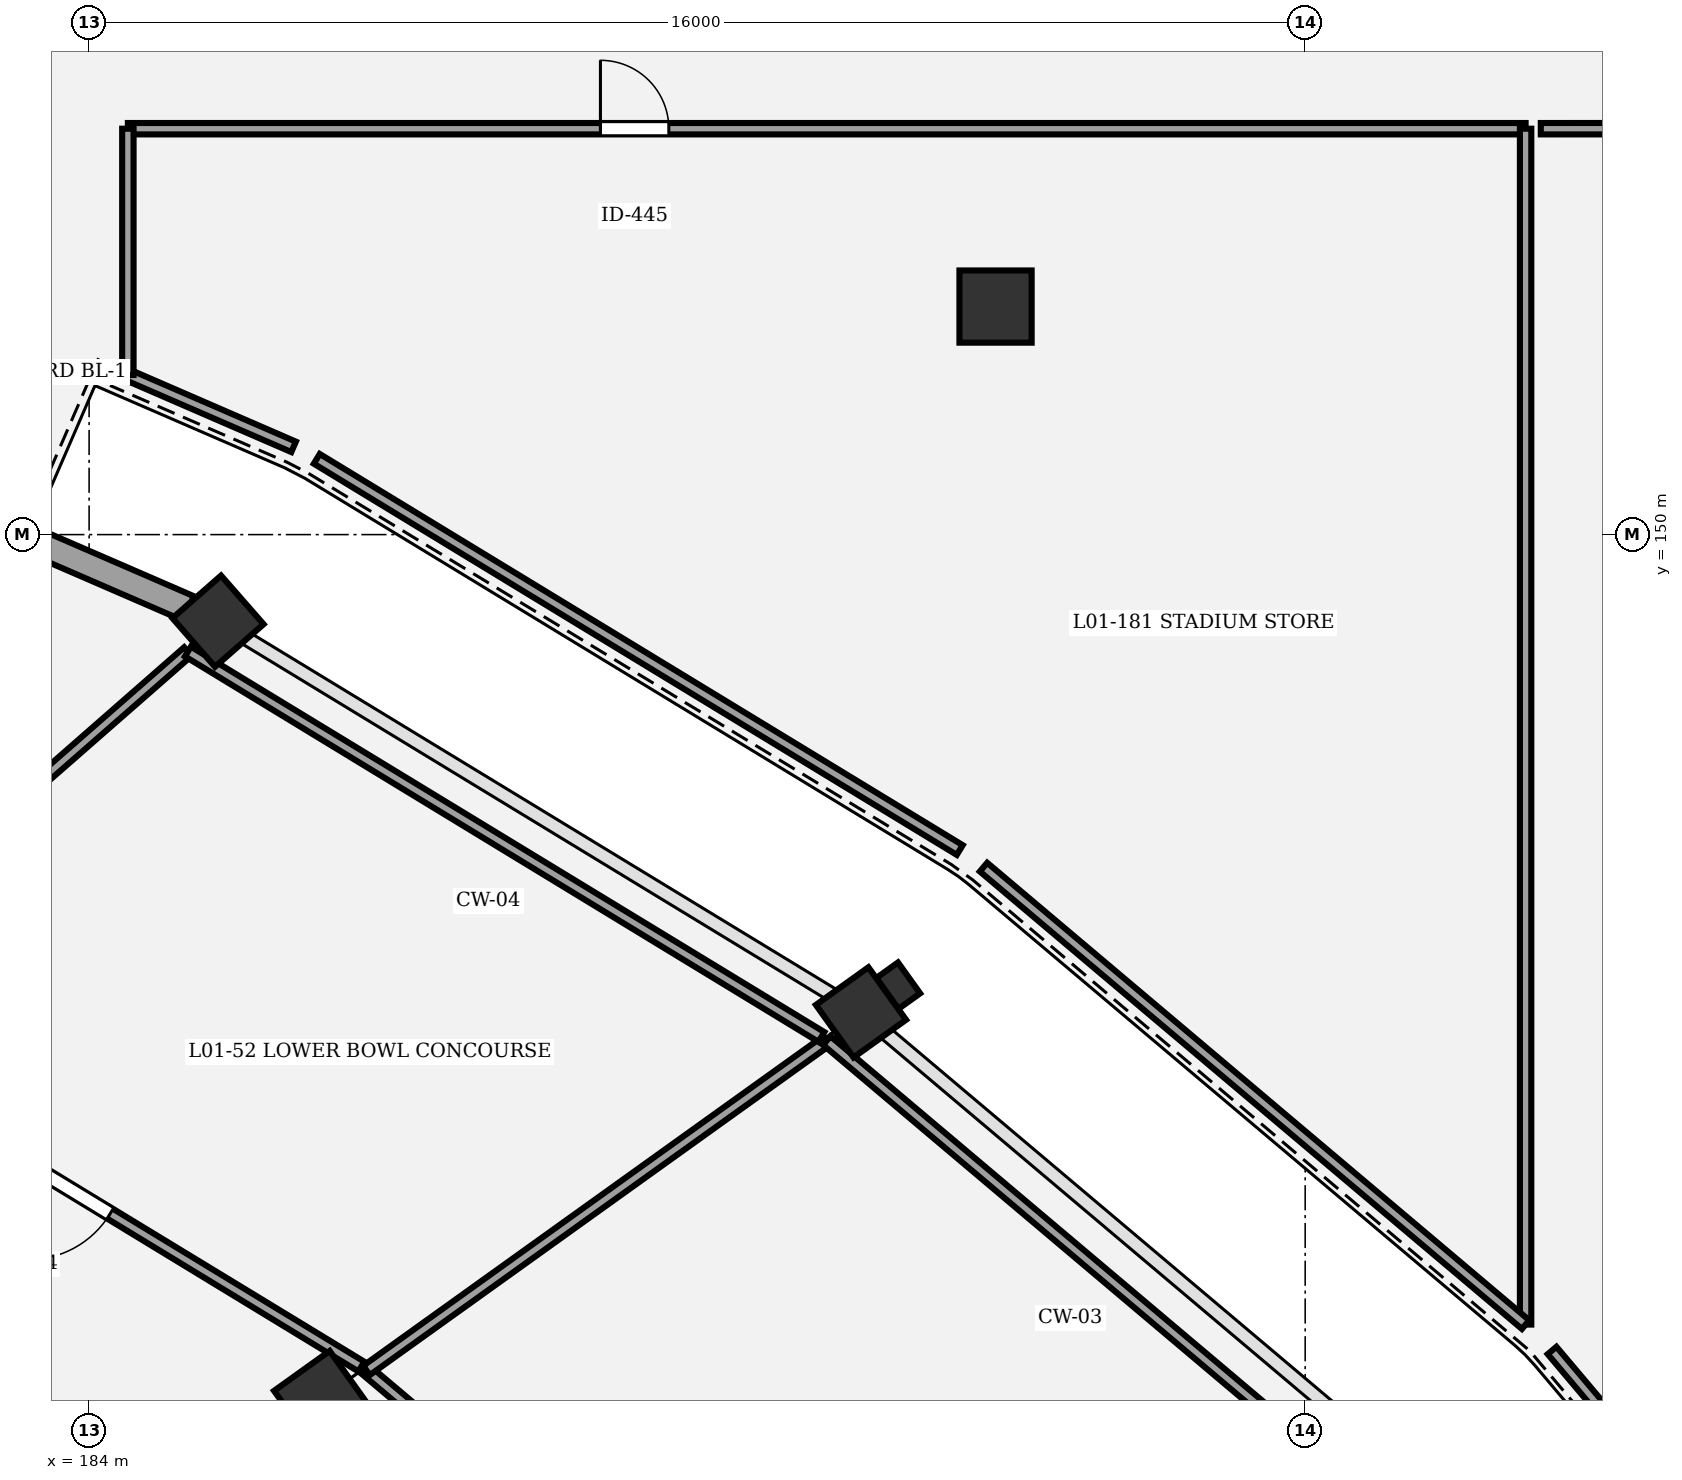
"""IFC4 building model, lengths in metres.
Left out: names, types, materials, properties, quantities, classifications, styles, units other than length and angle.
Written with IfcOpenShell. Run it as: python <this file> out.ifc"""

import sys

from ifc_helpers import new_model, si_unit, direction, frame, frame_2d, origin, origin_2d, place, context, subcontext, project, spatial, rectangle, circle, extrude, element, fill, save


model = new_model("IFC4")
c1 = context("Model", 3, precision=1e-05, world=origin(), true_north=direction((0.0, 1.0)))
c2 = subcontext(c1, "Body", "Model", "MODEL_VIEW")
j1 = project(units=[si_unit("LENGTHUNIT", "METRE"), si_unit("PLANEANGLEUNIT", "RADIAN")], contexts=[c1])
p1 = place(None, origin())
s1 = spatial("IfcSite", under=j1, at=p1, CompositionType="ELEMENT")
p2 = place(p1, origin())
s2 = spatial("IfcBuilding", under=s1, at=p2, CompositionType="ELEMENT")
p3 = place(p2, frame((0.0, 0.0, 5.4)))
s3 = spatial("IfcBuildingStorey", under=s2, at=p3, CompositionType="ELEMENT", Elevation=5.4)
p4 = place(p3, frame((187.061, 138.632, 0.0), z_axis=(0.0, 0.0, 1.0), x_axis=(0.812897512265, 0.582406760395, 0.0)))
e1 = element("IfcColumn", 1, at=p4, inside=s3, PredefinedType="COLUMN", context=c2, shape_type="SweptSolid", body=[
    extrude(rectangle(XDim=0.9, YDim=0.9, at=origin_2d()), origin(), (0.0, 0.0, 1.0), 4.8),
])
p5 = place(p3, frame((194.156, 143.715, 0.0), z_axis=(0.0, 0.0, 1.0), x_axis=(0.812897512265, 0.582406760395, 0.0)))
e2 = element("IfcColumn", 2, at=p5, inside=s3, PredefinedType="COLUMN", context=c2, shape_type="SweptSolid", body=[
    extrude(rectangle(XDim=0.85, YDim=0.85, at=origin_2d()), origin(), (0.0, 0.0, 1.0), 4.8),
])
p6 = place(p3, frame((194.646, 144.066, 0.0), z_axis=(0.0, 0.0, 1.0), x_axis=(-0.582406760395, 0.812897512265, 0.0)))
e3 = element("IfcColumn", 3, at=p6, inside=s3, PredefinedType="PILASTER", context=c2, shape_type="SweptSolid", body=[
    extrude(rectangle(XDim=0.5, YDim=0.35, at=origin_2d()), origin(), (0.0, 0.0, 1.0), 4.8),
])
p7 = place(p3, frame((185.696, 148.861, 0.0), z_axis=(0.0, 0.0, 1.0), x_axis=(0.752529860433, 0.658558128912, 0.0)))
e4 = element("IfcColumn", 4, at=p7, inside=s3, PredefinedType="COLUMN", context=c2, shape_type="SweptSolid", body=[
    extrude(rectangle(XDim=0.85, YDim=0.85, at=origin_2d()), origin(), (0.0, 0.0, 1.0), 4.8),
])
p8 = place(p3, frame((195.926, 153.0, 0.0), z_axis=(0.0, 0.0, 1.0), x_axis=(1.0, 0.0, 0.0)))
e5 = element("IfcColumn", 5, at=p8, inside=s3, PredefinedType="COLUMN", context=c2, shape_type="SweptSolid", body=[
    extrude(circle(Radius=0.475, at=origin_2d()), origin(), (0.0, 0.0, 1.0), 4.8),
])
p9 = place(p3, frame((176.326, 152.923, 0.0), z_axis=(0.0, 0.0, 1.0), x_axis=(0.91749374913, -0.397750198375, 0.0)))
e6 = element("IfcWall", 6, at=p9, inside=s3, PredefinedType="STANDARD", context=c2, shape_type="SweptSolid", body=[
    extrude(rectangle(XDim=9.79, YDim=0.35, at=frame_2d((4.895, 0.0))), origin(), (0.0, 0.0, 1.0), 3.57),
])
p10 = place(p9, frame((3.995, 0.0, 0.0)))
e7 = element("IfcOpeningElement", 7, at=p10, cuts=e6, PredefinedType="OPENING", context=c2, shape_type="SweptSolid", body=[
    extrude(rectangle(XDim=1.8, YDim=2.4, at=frame_2d((0.9, 1.2))), frame((0.0, 0.185, 0.0), z_axis=(0.0, -1.0, 0.0), x_axis=(1.0, 0.0, 0.0)), (0.0, 0.0, 1.0), 0.37),
])
p11 = place(p3, frame((194.175, 133.497, 0.0), z_axis=(0.0, 0.0, 1.0), x_axis=(-0.764257572309, 0.644911128117, 0.0)))
e8 = element("IfcWall", 8, at=p11, inside=s3, PredefinedType="PARTITIONING", context=c2, shape_type="SweptSolid", body=[
    extrude(rectangle(XDim=8.539, YDim=0.15, at=frame_2d((4.269, 0.0))), origin(), (0.0, 0.0, 1.0), 3.55),
])
p12 = place(p11, frame((3.679, 0.0, 0.0)))
e9 = element("IfcOpeningElement", 9, at=p12, cuts=e8, PredefinedType="OPENING", context=c2, shape_type="SweptSolid", body=[
    extrude(rectangle(XDim=1.18, YDim=2.2, at=frame_2d((0.59, 1.1))), frame((0.0, 0.085, 0.0), z_axis=(0.0, -1.0, 0.0), x_axis=(1.0, 0.0, 0.0)), (0.0, 0.0, 1.0), 0.17),
])
p13 = place(p3, frame((187.582, 139.054, 0.0), z_axis=(0.0, 0.0, 1.0), x_axis=(-0.854321649351, 0.519744667554, 0.0)))
e10 = element("IfcWall", 10, at=p13, inside=s3, PredefinedType="PARTITIONING", context=c2, shape_type="SweptSolid", body=[
    extrude(rectangle(XDim=8.999, YDim=0.15, at=frame_2d((4.499, 0.0))), origin(), (0.0, 0.0, 1.0), 3.55),
])
p14 = place(p13, frame((3.869, 0.0, 0.0)))
e11 = element("IfcOpeningElement", 11, at=p14, cuts=e10, PredefinedType="OPENING", context=c2, shape_type="SweptSolid", body=[
    extrude(rectangle(XDim=1.26, YDim=2.2, at=frame_2d((0.63, 1.1))), frame((0.0, 0.085, 0.0), z_axis=(0.0, -1.0, 0.0), x_axis=(1.0, 0.0, 0.0)), (0.0, 0.0, 1.0), 0.17),
])
p15 = place(p3, frame((184.51, 155.34, 0.0), z_axis=(0.0, 0.0, 1.0), x_axis=(1.0, 0.0, 0.0)))
e12 = element("IfcWall", 12, at=p15, inside=s3, PredefinedType="PARTITIONING", context=c2, shape_type="SweptSolid", body=[
    extrude(rectangle(XDim=18.39, YDim=0.15, at=frame_2d((9.195, 0.0))), origin(), (0.0, 0.0, 1.0), 3.55),
])
p16 = place(p15, frame((6.218, 0.0, 0.0)))
e13 = element("IfcOpeningElement", 13, at=p16, cuts=e12, PredefinedType="OPENING", context=c2, shape_type="SweptSolid", body=[
    extrude(rectangle(XDim=0.9, YDim=2.2, at=frame_2d((0.45, 1.1))), frame((0.0, 0.085, 0.0), z_axis=(0.0, -1.0, 0.0), x_axis=(1.0, 0.0, 0.0)), (0.0, 0.0, 1.0), 0.17),
])
p17 = place(p3, frame((187.649, 139.004, 0.0), z_axis=(0.0, 0.0, 1.0), x_axis=(0.812884613266, 0.582424763824, 0.0)))
e14 = element("IfcWall", 14, at=p17, inside=s3, PredefinedType="PARTITIONING", context=c2, shape_type="SweptSolid", body=[
    extrude(rectangle(XDim=7.45, YDim=0.15, at=frame_2d((3.725, 0.0))), origin(), (0.0, 0.0, 1.0), 3.55),
])
p18 = place(p3, frame((193.706, 143.343, 0.0), z_axis=(0.0, 0.0, 1.0), x_axis=(0.764252893528, -0.644916672706, 0.0)))
e15 = element("IfcWall", 15, at=p18, inside=s3, PredefinedType="PARTITIONING", context=c2, shape_type="SweptSolid", body=[
    extrude(rectangle(XDim=9.257, YDim=0.15, at=frame_2d((4.629, 0.0))), origin(), (0.0, 0.0, 1.0), 3.55),
])
p19 = place(p3, frame((179.895, 143.731, 0.0), z_axis=(0.0, 0.0, 1.0), x_axis=(0.752564061831, 0.658519045162, 0.0)))
e16 = element("IfcWall", 16, at=p19, inside=s3, PredefinedType="PARTITIONING", context=c2, shape_type="SweptSolid", body=[
    extrude(rectangle(XDim=7.183, YDim=0.15, at=frame_2d((3.592, 0.0))), origin(), (0.0, 0.0, 1.0), 3.55),
])
p20 = place(p3, frame((185.3, 148.461, 0.0), z_axis=(0.0, 0.0, 1.0), x_axis=(0.854323689683, -0.519741313777, 0.0)))
e17 = element("IfcWall", 17, at=p20, inside=s3, PredefinedType="PARTITIONING", context=c2, shape_type="SweptSolid", body=[
    extrude(rectangle(XDim=9.756, YDim=0.15, at=frame_2d((4.878, 0.0))), origin(), (0.0, 0.0, 1.0), 3.55),
])
p21 = place(p3, frame((195.455, 145.85, 0.0), z_axis=(0.0, 0.0, 1.0), x_axis=(-0.854333268174, 0.519725568826, 0.0)))
e18 = element("IfcWall", 18, at=p21, inside=s3, PredefinedType="PARTITIONING", context=c2, shape_type="SweptSolid", body=[
    extrude(rectangle(XDim=9.902, YDim=0.15, at=frame_2d((4.951, 0.0))), origin(), (0.0, 0.0, 1.0), 3.55),
])
p22 = place(p3, frame((186.69, 151.155, 0.0), z_axis=(0.0, 0.0, 1.0), x_axis=(-0.917484400903, 0.397771761314, 0.0)))
e19 = element("IfcWall", 19, at=p22, inside=s3, PredefinedType="PARTITIONING", context=c2, shape_type="SweptSolid", body=[
    extrude(rectangle(XDim=2.376, YDim=0.15, at=frame_2d((1.188, 0.0))), origin(), (0.0, 0.0, 1.0), 3.55),
])
p23 = place(p3, frame((184.51, 152.1, 0.0), z_axis=(0.0, 0.0, 1.0), x_axis=(0.0, 1.0, 0.0)))
e20 = element("IfcWall", 20, at=p23, inside=s3, PredefinedType="PARTITIONING", context=c2, shape_type="SweptSolid", body=[
    extrude(rectangle(XDim=3.24, YDim=0.15, at=frame_2d((1.62, 0.0))), origin(), (0.0, 0.0, 1.0), 3.55),
])
p24 = place(p3, frame((202.9, 155.34, 0.0), z_axis=(0.0, 0.0, 1.0), x_axis=(0.0, -1.0, 0.0)))
e21 = element("IfcWall", 21, at=p24, inside=s3, PredefinedType="PARTITIONING", context=c2, shape_type="SweptSolid", body=[
    extrude(rectangle(XDim=15.733, YDim=0.15, at=frame_2d((7.867, 0.0))), origin(), (0.0, 0.0, 1.0), 3.55),
])
p25 = place(p3, frame((202.9, 139.607, 0.0), z_axis=(0.0, 0.0, 1.0), x_axis=(-0.764245949545, 0.644924901523, 0.0)))
e22 = element("IfcWall", 22, at=p25, inside=s3, PredefinedType="PARTITIONING", context=c2, shape_type="SweptSolid", body=[
    extrude(rectangle(XDim=9.332, YDim=0.15, at=frame_2d((4.666, 0.0))), origin(), (0.0, 0.0, 1.0), 3.55),
])
p26 = place(p3, frame((209.153, 132.274, 0.0), z_axis=(0.0, 0.0, 1.0), x_axis=(-0.645180125691, 0.764030500316, 0.0)))
e23 = element("IfcWall", 23, at=p26, inside=s3, PredefinedType="PARTITIONING", context=c2, shape_type="SweptSolid", body=[
    extrude(rectangle(XDim=9.151, YDim=0.15, at=frame_2d((4.576, 0.0))), origin(), (0.0, 0.0, 1.0), 3.55),
])
p27 = place(p3, frame((203.1, 155.34, 0.0), z_axis=(0.0, 0.0, 1.0), x_axis=(0.99999997621, 0.00021812629, 0.0)))
e24 = element("IfcWall", 24, at=p27, inside=s3, PredefinedType="PARTITIONING", context=c2, shape_type="SweptSolid", body=[
    extrude(rectangle(XDim=13.431, YDim=0.15, at=frame_2d((6.716, 0.0))), origin(), (0.0, 0.0, 1.0), 3.55),
])
p28 = place(p14, origin())
e25 = element("IfcDoor", 25, at=p28, inside=s3, OperationType="SINGLE_SWING_RIGHT", PredefinedType="DOOR", context=c2, shape_type="SweptSolid", body=[
    extrude(rectangle(XDim=1.26, YDim=2.2, at=frame_2d((0.63, 1.1))), frame((0.0, 0.025, 0.0), z_axis=(0.0, -1.0, 0.0), x_axis=(1.0, 0.0, 0.0)), (0.0, 0.0, 1.0), 0.05),
])
fill(e11, e25)
p29 = place(p16, origin())
e26 = element("IfcDoor", 26, at=p29, inside=s3, OperationType="SINGLE_SWING_LEFT", PredefinedType="DOOR", context=c2, shape_type="SweptSolid", body=[
    extrude(rectangle(XDim=0.9, YDim=2.2, at=frame_2d((0.45, 1.1))), frame((0.0, 0.025, 0.0), z_axis=(0.0, -1.0, 0.0), x_axis=(1.0, 0.0, 0.0)), (0.0, 0.0, 1.0), 0.05),
])
fill(e13, e26)
save(model, sys.argv[1])
